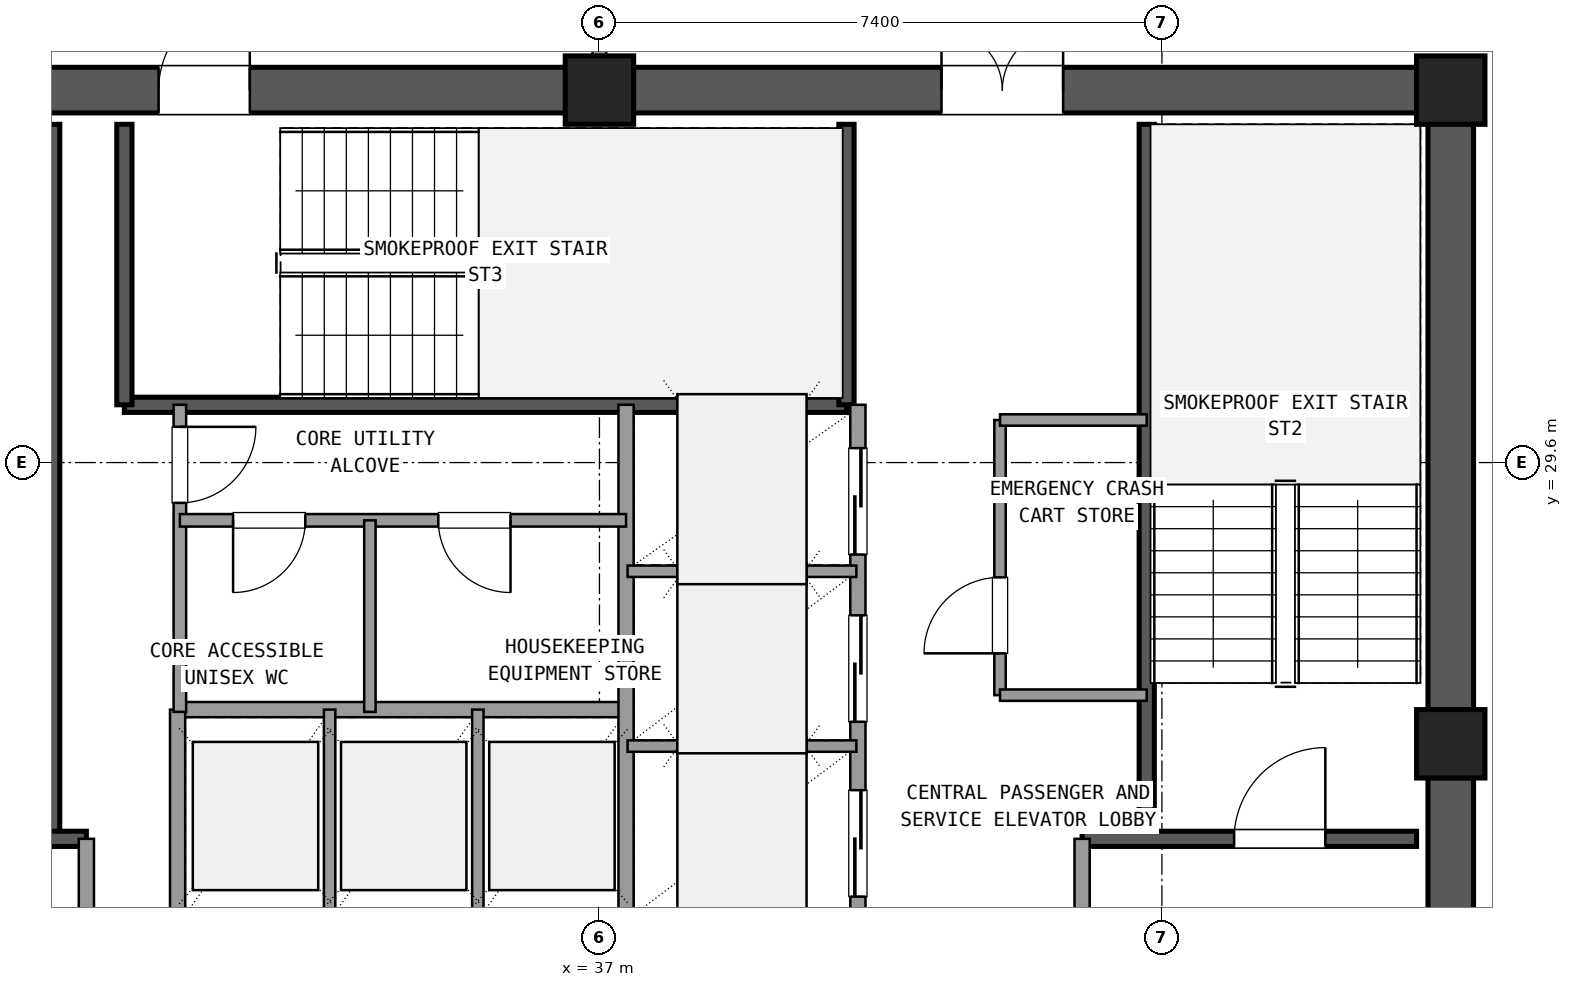
"""IFC4 building model, lengths in metres.
Left out: names, types, materials, properties, quantities, classifications, styles, units other than length and angle.
Written with IfcOpenShell. Run it as: python <this file> out.ifc"""

import sys

from ifc_helpers import new_model, si_unit, direction, frame, frame_2d, origin, origin_2d, place, context, subcontext, project, spatial, rectangle, extrude, element, fill, save


model = new_model("IFC4")
c1 = context("Model", 3, precision=1e-05, world=origin(), true_north=direction((0.0, 1.0)))
c2 = subcontext(c1, "Body", "Model", "MODEL_VIEW")
j1 = project(units=[si_unit("LENGTHUNIT", "METRE"), si_unit("PLANEANGLEUNIT", "RADIAN")], contexts=[c1])
p1 = place(None, origin())
s1 = spatial("IfcSite", under=j1, at=p1, CompositionType="ELEMENT")
p2 = place(p1, origin())
s2 = spatial("IfcBuilding", under=s1, at=p2, CompositionType="ELEMENT")
p3 = place(p2, frame((0.0, 0.0, 221.58)))
s3 = spatial("IfcBuildingStorey", under=s2, at=p3, CompositionType="ELEMENT", Elevation=221.58)
for number, where, z_axis, x_axis in (
    (1, (48.2, 25.9, 0.0), (0.0, 0.0, 1.0), (1.0, 0.0, 0.0)),
    (2, (48.2, 34.5, 0.0), (0.0, 0.0, 1.0), (1.0, 0.0, 0.0)),
    (3, (37.0, 34.5, 0.0), (0.0, 0.0, 1.0), (1.0, 0.0, 0.0)),
):
    element("IfcColumn", number, at=place(p3, frame(where, z_axis=z_axis, x_axis=x_axis)), inside=s3, PredefinedType="COLUMN", context=c2, shape_type="SweptSolid", body=[
        extrude(rectangle(XDim=0.9, YDim=0.9, at=origin_2d()), origin(), (0.0, 0.0, 1.0), 3.6),
    ])
p4 = place(p3, frame((48.2, 17.745, 0.0), z_axis=(0.0, 0.0, 1.0), x_axis=(0.0, 1.0, 0.0)))
e4 = element("IfcWall", 4, at=p4, inside=s3, PredefinedType="SHEAR", context=c2, shape_type="SweptSolid", body=[
    extrude(rectangle(XDim=7.71, YDim=0.6, at=frame_2d((3.855, 0.0))), origin(), (0.0, 0.0, 1.0), 3.32),
])
p5 = place(p4, frame((4.305, 0.0, 0.0)))
e5 = element("IfcOpeningElement", 5, at=p5, cuts=e4, PredefinedType="OPENING", context=c2, shape_type="SweptSolid", body=[
    extrude(rectangle(XDim=1.2, YDim=2.15, at=frame_2d((0.6, 1.075))), frame((0.0, 0.31, 0.0), z_axis=(0.0, -1.0, 0.0), x_axis=(1.0, 0.0, 0.0)), (0.0, 0.0, 1.0), 0.62),
])
p6 = place(p3, frame((48.2, 26.345, 0.0), z_axis=(0.0, 0.0, 1.0), x_axis=(0.0, 1.0, 0.0)))
e6 = element("IfcWall", 6, at=p6, inside=s3, PredefinedType="SHEAR", context=c2, shape_type="SweptSolid", body=[
    extrude(rectangle(XDim=7.71, YDim=0.6, at=frame_2d((3.855, 0.0))), origin(), (0.0, 0.0, 1.0), 3.32),
])
p7 = place(p3, frame((47.755, 34.5, 0.0), z_axis=(0.0, 0.0, 1.0), x_axis=(-1.0, 0.0, 0.0)))
e7 = element("IfcWall", 7, at=p7, inside=s3, PredefinedType="SHEAR", context=c2, shape_type="SweptSolid", body=[
    extrude(rectangle(XDim=10.31, YDim=0.6, at=frame_2d((5.155, 0.0))), origin(), (0.0, 0.0, 1.0), 3.32),
])
p8 = place(p7, frame((4.655, 0.0, 0.0)))
e8 = element("IfcOpeningElement", 8, at=p8, cuts=e7, PredefinedType="OPENING", context=c2, shape_type="SweptSolid", body=[
    extrude(rectangle(XDim=1.6, YDim=2.2, at=frame_2d((0.8, 1.1))), frame((0.0, 0.31, 0.0), z_axis=(0.0, -1.0, 0.0), x_axis=(1.0, 0.0, 0.0)), (0.0, 0.0, 1.0), 0.62),
])
p9 = place(p3, frame((36.555, 34.5, 0.0), z_axis=(0.0, 0.0, 1.0), x_axis=(-1.0, 0.0, 0.0)))
e9 = element("IfcWall", 9, at=p9, inside=s3, PredefinedType="SHEAR", context=c2, shape_type="SweptSolid", body=[
    extrude(rectangle(XDim=10.31, YDim=0.6, at=frame_2d((5.155, 0.0))), origin(), (0.0, 0.0, 1.0), 3.32),
])
p10 = place(p9, frame((4.155, 0.0, 0.0)))
e10 = element("IfcOpeningElement", 10, at=p10, cuts=e9, PredefinedType="OPENING", context=c2, shape_type="SweptSolid", body=[
    extrude(rectangle(XDim=1.2, YDim=2.15, at=frame_2d((0.6, 1.075))), frame((0.0, 0.31, 0.0), z_axis=(0.0, -1.0, 0.0), x_axis=(1.0, 0.0, 0.0)), (0.0, 0.0, 1.0), 0.62),
])
p11 = place(p3, frame((29.8, 24.65, 0.0), z_axis=(0.0, 0.0, 1.0), x_axis=(0.0, 1.0, 0.0)))
e11 = element("IfcWall", 11, at=p11, inside=s3, PredefinedType="SHEAR", context=c2, shape_type="SweptSolid", body=[
    extrude(rectangle(XDim=9.4, YDim=0.2, at=frame_2d((4.7, 0.0))), origin(), (0.0, 0.0, 1.0), 3.32),
])
p12 = place(p3, frame((26.25, 24.65, 0.0), z_axis=(0.0, 0.0, 1.0), x_axis=(1.0, 0.0, 0.0)))
e12 = element("IfcWall", 12, at=p12, inside=s3, PredefinedType="SHEAR", context=c2, shape_type="SweptSolid", body=[
    extrude(rectangle(XDim=4.0, YDim=0.2, at=frame_2d((2.0, 0.0))), origin(), (0.0, 0.0, 1.0), 3.32),
])
p13 = place(p12, frame((1.0, 0.0, 0.0)))
e13 = element("IfcOpeningElement", 13, at=p13, cuts=e12, PredefinedType="OPENING", context=c2, shape_type="SweptSolid", body=[
    extrude(rectangle(XDim=1.2, YDim=2.15, at=frame_2d((0.6, 1.075))), frame((0.0, 0.11, 0.0), z_axis=(0.0, -1.0, 0.0), x_axis=(1.0, 0.0, 0.0)), (0.0, 0.0, 1.0), 0.22),
])
p14 = place(p3, frame((44.2, 24.65, 0.0), z_axis=(0.0, 0.0, 1.0), x_axis=(0.0, 1.0, 0.0)))
e14 = element("IfcWall", 14, at=p14, inside=s3, PredefinedType="SHEAR", context=c2, shape_type="SweptSolid", body=[
    extrude(rectangle(XDim=9.4, YDim=0.2, at=frame_2d((4.7, 0.0))), origin(), (0.0, 0.0, 1.0), 3.32),
])
p15 = place(p3, frame((43.35, 24.65, 0.0), z_axis=(0.0, 0.0, 1.0), x_axis=(1.0, 0.0, 0.0)))
e15 = element("IfcWall", 15, at=p15, inside=s3, PredefinedType="SHEAR", context=c2, shape_type="SweptSolid", body=[
    extrude(rectangle(XDim=4.4, YDim=0.2, at=frame_2d((2.2, 0.0))), origin(), (0.0, 0.0, 1.0), 3.32),
])
p16 = place(p15, frame((2.0, 0.0, 0.0)))
e16 = element("IfcOpeningElement", 16, at=p16, cuts=e15, PredefinedType="OPENING", context=c2, shape_type="SweptSolid", body=[
    extrude(rectangle(XDim=1.2, YDim=2.15, at=frame_2d((0.6, 1.075))), frame((0.0, 0.11, 0.0), z_axis=(0.0, -1.0, 0.0), x_axis=(1.0, 0.0, 0.0)), (0.0, 0.0, 1.0), 0.22),
])
p17 = place(p3, frame((30.75, 30.36, 0.0), z_axis=(0.0, 0.0, 1.0), x_axis=(1.0, 0.0, 0.0)))
e17 = element("IfcWall", 17, at=p17, inside=s3, PredefinedType="SHEAR", context=c2, shape_type="SweptSolid", body=[
    extrude(rectangle(XDim=9.5, YDim=0.2, at=frame_2d((4.75, 0.0))), origin(), (0.0, 0.0, 1.0), 3.32),
])
for number, where, z_axis, x_axis in (
    (18, (30.75, 30.36, 0.0), (0.0, 0.0, 1.0), (0.0, 1.0, 0.0)),
    (19, (40.25, 30.36, 0.0), (0.0, 0.0, 1.0), (0.0, 1.0, 0.0)),
):
    element("IfcWall", number, at=place(p3, frame(where, z_axis=z_axis, x_axis=x_axis)), inside=s3, PredefinedType="SHEAR", context=c2, shape_type="SweptSolid", body=[
        extrude(rectangle(XDim=3.69, YDim=0.2, at=frame_2d((1.845, 0.0))), origin(), (0.0, 0.0, 1.0), 3.32),
    ])
p18 = place(p3, frame((30.25, 17.75, 0.0), z_axis=(0.0, 0.0, 1.0), x_axis=(0.0, 1.0, 0.0)))
e20 = element("IfcWall", 20, at=p18, inside=s3, PredefinedType="SOLIDWALL", context=c2, shape_type="SweptSolid", body=[
    extrude(rectangle(XDim=6.9, YDim=0.2, at=frame_2d((3.45, 0.0))), origin(), (0.0, 0.0, 1.0), 2.61),
])
p19 = place(p18, frame((4.15, 0.0, 0.0)))
e21 = element("IfcOpeningElement", 21, at=p19, cuts=e20, PredefinedType="OPENING", context=c2, shape_type="SweptSolid", body=[
    extrude(rectangle(XDim=1.2, YDim=2.15, at=frame_2d((0.6, 1.075))), frame((0.0, 0.11, 0.0), z_axis=(0.0, -1.0, 0.0), x_axis=(1.0, 0.0, 0.0)), (0.0, 0.0, 1.0), 0.22),
])
p20 = place(p3, frame((43.35, 17.75, 0.0), z_axis=(0.0, 0.0, 1.0), x_axis=(0.0, 1.0, 0.0)))
e22 = element("IfcWall", 22, at=p20, inside=s3, PredefinedType="SOLIDWALL", context=c2, shape_type="SweptSolid", body=[
    extrude(rectangle(XDim=6.9, YDim=0.2, at=frame_2d((3.45, 0.0))), origin(), (0.0, 0.0, 1.0), 2.61),
])
p21 = place(p20, frame((4.15, 0.0, 0.0)))
e23 = element("IfcOpeningElement", 23, at=p21, cuts=e22, PredefinedType="OPENING", context=c2, shape_type="SweptSolid", body=[
    extrude(rectangle(XDim=1.2, YDim=2.15, at=frame_2d((0.6, 1.075))), frame((0.0, 0.11, 0.0), z_axis=(0.0, -1.0, 0.0), x_axis=(1.0, 0.0, 0.0)), (0.0, 0.0, 1.0), 0.22),
])
p22 = place(p3, frame((31.45, 26.35, 0.0), z_axis=(0.0, 0.0, 1.0), x_axis=(1.0, 0.0, 0.0)))
e24 = element("IfcWall", 24, at=p22, inside=s3, PredefinedType="SOLIDWALL", context=c2, shape_type="SweptSolid", body=[
    extrude(rectangle(XDim=5.9, YDim=0.2, at=frame_2d((2.95, 0.0))), origin(), (0.0, 0.0, 1.0), 2.61),
])
p23 = place(p3, frame((31.45, 23.54, 0.0), z_axis=(0.0, 0.0, 1.0), x_axis=(0.0, 1.0, 0.0)))
e25 = element("IfcWall", 25, at=p23, inside=s3, PredefinedType="SOLIDWALL", context=c2, shape_type="SweptSolid", body=[
    extrude(rectangle(XDim=2.81, YDim=0.2, at=frame_2d((1.405, 0.0))), origin(), (0.0, 0.0, 1.0), 2.61),
])
for number, where, z_axis, x_axis in (
    (26, (33.45, 23.54, 0.0), (0.0, 0.0, 1.0), (0.0, 1.0, 0.0)),
    (27, (35.4, 23.54, 0.0), (0.0, 0.0, 1.0), (0.0, 1.0, 0.0)),
):
    element("IfcWall", number, at=place(p3, frame(where, z_axis=z_axis, x_axis=x_axis)), inside=s3, PredefinedType="PARTITIONING", context=c2, shape_type="SweptSolid", body=[
        extrude(rectangle(XDim=2.81, YDim=0.15, at=frame_2d((1.405, 0.0))), origin(), (0.0, 0.0, 1.0), 2.61),
    ])
p24 = place(p3, frame((37.35, 23.54, 0.0), z_axis=(0.0, 0.0, 1.0), x_axis=(0.0, 1.0, 0.0)))
e28 = element("IfcWall", 28, at=p24, inside=s3, PredefinedType="SOLIDWALL", context=c2, shape_type="SweptSolid", body=[
    extrude(rectangle(XDim=6.82, YDim=0.2, at=frame_2d((3.41, 0.0))), origin(), (0.0, 0.0, 1.0), 2.61),
])
p25 = place(p3, frame((40.4, 23.54, 0.0), z_axis=(0.0, 0.0, 1.0), x_axis=(0.0, 1.0, 0.0)))
e29 = element("IfcWall", 29, at=p25, inside=s3, PredefinedType="SOLIDWALL", context=c2, shape_type="SweptSolid", body=[
    extrude(rectangle(XDim=6.82, YDim=0.2, at=frame_2d((3.41, 0.0))), origin(), (0.0, 0.0, 1.0), 2.61),
])
p26 = place(p25, frame((0.35, 0.0, 0.0)))
e30 = element("IfcOpeningElement", 30, at=p26, cuts=e29, PredefinedType="OPENING", context=c2, shape_type="SweptSolid", body=[
    extrude(rectangle(XDim=1.4, YDim=2.2, at=frame_2d((0.7, 1.1))), frame((0.0, 0.11, 0.0), z_axis=(0.0, -1.0, 0.0), x_axis=(1.0, 0.0, 0.0)), (0.0, 0.0, 1.0), 0.22),
])
p27 = place(p25, frame((2.65, 0.0, 0.0)))
e31 = element("IfcOpeningElement", 31, at=p27, cuts=e29, PredefinedType="OPENING", context=c2, shape_type="SweptSolid", body=[
    extrude(rectangle(XDim=1.4, YDim=2.2, at=frame_2d((0.7, 1.1))), frame((0.0, 0.11, 0.0), z_axis=(0.0, -1.0, 0.0), x_axis=(1.0, 0.0, 0.0)), (0.0, 0.0, 1.0), 0.22),
])
p28 = place(p25, frame((4.85, 0.0, 0.0)))
e32 = element("IfcOpeningElement", 32, at=p28, cuts=e29, PredefinedType="OPENING", context=c2, shape_type="SweptSolid", body=[
    extrude(rectangle(XDim=1.4, YDim=2.2, at=frame_2d((0.7, 1.1))), frame((0.0, 0.11, 0.0), z_axis=(0.0, -1.0, 0.0), x_axis=(1.0, 0.0, 0.0)), (0.0, 0.0, 1.0), 0.22),
])
for number, where, z_axis, x_axis in (
    (33, (37.37, 25.87, 0.0), (0.0, 0.0, 1.0), (1.0, 0.0, 0.0)),
    (34, (37.37, 28.17, 0.0), (0.0, 0.0, 1.0), (1.0, 0.0, 0.0)),
):
    element("IfcWall", number, at=place(p3, frame(where, z_axis=z_axis, x_axis=x_axis)), inside=s3, PredefinedType="PARTITIONING", context=c2, shape_type="SweptSolid", body=[
        extrude(rectangle(XDim=3.01, YDim=0.15, at=frame_2d((1.505, 0.0))), origin(), (0.0, 0.0, 1.0), 2.61),
    ])
p29 = place(p3, frame((42.27, 26.54, 0.0), z_axis=(0.0, 0.0, 1.0), x_axis=(0.0, 1.0, 0.0)))
e35 = element("IfcWall", 35, at=p29, inside=s3, PredefinedType="PARTITIONING", context=c2, shape_type="SweptSolid", body=[
    extrude(rectangle(XDim=3.62, YDim=0.15, at=frame_2d((1.81, 0.0))), origin(), (0.0, 0.0, 1.0), 2.61),
])
p30 = place(p29, frame((0.55, 0.0, 0.0)))
e36 = element("IfcOpeningElement", 36, at=p30, cuts=e35, PredefinedType="OPENING", context=c2, shape_type="SweptSolid", body=[
    extrude(rectangle(XDim=1.0, YDim=2.15, at=frame_2d((0.5, 1.075))), frame((0.0, 0.085, 0.0), z_axis=(0.0, -1.0, 0.0), x_axis=(1.0, 0.0, 0.0)), (0.0, 0.0, 1.0), 0.17),
])
for number, where, z_axis, x_axis in (
    (37, (42.27, 26.54, 0.0), (0.0, 0.0, 1.0), (1.0, 0.0, 0.0)),
    (38, (42.27, 30.16, 0.0), (0.0, 0.0, 1.0), (1.0, 0.0, 0.0)),
):
    element("IfcWall", number, at=place(p3, frame(where, z_axis=z_axis, x_axis=x_axis)), inside=s3, PredefinedType="PARTITIONING", context=c2, shape_type="SweptSolid", body=[
        extrude(rectangle(XDim=1.93, YDim=0.15, at=frame_2d((0.965, 0.0))), origin(), (0.0, 0.0, 1.0), 2.61),
    ])
p31 = place(p3, frame((31.48, 26.32, 0.0), z_axis=(0.0, 0.0, 1.0), x_axis=(0.0, 1.0, 0.0)))
e39 = element("IfcWall", 39, at=p31, inside=s3, PredefinedType="PLUMBINGWALL", context=c2, shape_type="SweptSolid", body=[
    extrude(rectangle(XDim=4.04, YDim=0.165, at=frame_2d((2.02, 0.0))), origin(), (0.0, 0.0, 1.0), 2.61),
])
p32 = place(p31, frame((2.75, 0.0, 0.0)))
e40 = element("IfcOpeningElement", 40, at=p32, cuts=e39, PredefinedType="OPENING", context=c2, shape_type="SweptSolid", body=[
    extrude(rectangle(XDim=1.0, YDim=2.15, at=frame_2d((0.5, 1.075))), frame((0.0, 0.093, 0.0), z_axis=(0.0, -1.0, 0.0), x_axis=(1.0, 0.0, 0.0)), (0.0, 0.0, 1.0), 0.185),
])
p33 = place(p3, frame((31.48, 28.84, 0.0), z_axis=(0.0, 0.0, 1.0), x_axis=(1.0, 0.0, 0.0)))
e41 = element("IfcWall", 41, at=p33, inside=s3, PredefinedType="PLUMBINGWALL", context=c2, shape_type="SweptSolid", body=[
    extrude(rectangle(XDim=5.87, YDim=0.165, at=frame_2d((2.935, 0.0))), origin(), (0.0, 0.0, 1.0), 2.61),
])
p34 = place(p33, frame((0.7, 0.0, 0.0)))
e42 = element("IfcOpeningElement", 42, at=p34, cuts=e41, PredefinedType="OPENING", context=c2, shape_type="SweptSolid", body=[
    extrude(rectangle(XDim=0.95, YDim=2.1, at=frame_2d((0.475, 1.05))), frame((0.0, 0.093, 0.0), z_axis=(0.0, -1.0, 0.0), x_axis=(1.0, 0.0, 0.0)), (0.0, 0.0, 1.0), 0.185),
])
p35 = place(p33, frame((3.4, 0.0, 0.0)))
e43 = element("IfcOpeningElement", 43, at=p35, cuts=e41, PredefinedType="OPENING", context=c2, shape_type="SweptSolid", body=[
    extrude(rectangle(XDim=0.95, YDim=2.1, at=frame_2d((0.475, 1.05))), frame((0.0, 0.093, 0.0), z_axis=(0.0, -1.0, 0.0), x_axis=(1.0, 0.0, 0.0)), (0.0, 0.0, 1.0), 0.185),
])
p36 = place(p3, frame((33.98, 26.32, 0.0), z_axis=(0.0, 0.0, 1.0), x_axis=(0.0, 1.0, 0.0)))
e44 = element("IfcWall", 44, at=p36, inside=s3, PredefinedType="PARTITIONING", context=c2, shape_type="SweptSolid", body=[
    extrude(rectangle(XDim=2.52, YDim=0.15, at=frame_2d((1.26, 0.0))), origin(), (0.0, 0.0, 1.0), 2.61),
])
p37 = place(p3, frame((37.0, 34.95, 0.0), z_axis=(0.0, 0.0, 1.0), x_axis=(0.0, 1.0, 0.0)))
e45 = element("IfcWall", 45, at=p37, inside=s3, PredefinedType="PARTITIONING", context=c2, shape_type="SweptSolid", body=[
    extrude(rectangle(XDim=2.7, YDim=0.18, at=frame_2d((1.35, 0.0))), origin(), (0.0, 0.0, 1.0), 2.61),
])
p38 = place(p37, frame((0.35, 0.0, 0.0)))
e46 = element("IfcOpeningElement", 46, at=p38, cuts=e45, PredefinedType="OPENING", context=c2, shape_type="SweptSolid", body=[
    extrude(rectangle(XDim=2.0, YDim=2.2, at=frame_2d((1.0, 1.1))), frame((0.0, 0.1, 0.0), z_axis=(0.0, -1.0, 0.0), x_axis=(1.0, 0.0, 0.0)), (0.0, 0.0, 1.0), 0.2),
])
p39 = place(p16, origin())
e47 = element("IfcDoor", 47, at=p39, inside=s3, OperationType="SINGLE_SWING_RIGHT", PredefinedType="DOOR", context=c2, shape_type="SweptSolid", body=[
    extrude(rectangle(XDim=1.2, YDim=2.15, at=frame_2d((0.6, 1.075))), frame((0.0, 0.025, 0.0), z_axis=(0.0, -1.0, 0.0), x_axis=(1.0, 0.0, 0.0)), (0.0, 0.0, 1.0), 0.05),
])
fill(e16, e47)
p40 = place(p8, frame((1.6, 0.0, 0.0), z_axis=(0.0, 0.0, 1.0), x_axis=(-1.0, 0.0, 0.0)))
e48 = element("IfcDoor", 48, at=p40, inside=s3, OperationType="DOUBLE_DOOR_SINGLE_SWING", PredefinedType="DOOR", context=c2, shape_type="SweptSolid", body=[
    extrude(rectangle(XDim=1.6, YDim=2.2, at=frame_2d((0.8, 1.1))), frame((0.0, 0.025, 0.0), z_axis=(0.0, -1.0, 0.0), x_axis=(1.0, 0.0, 0.0)), (0.0, 0.0, 1.0), 0.05),
])
fill(e8, e48)
p41 = place(p10, frame((1.2, 0.0, 0.0), z_axis=(0.0, 0.0, 1.0), x_axis=(-1.0, 0.0, 0.0)))
e49 = element("IfcDoor", 49, at=p41, inside=s3, OperationType="SINGLE_SWING_LEFT", PredefinedType="DOOR", context=c2, shape_type="SweptSolid", body=[
    extrude(rectangle(XDim=1.2, YDim=2.15, at=frame_2d((0.6, 1.075))), frame((0.0, 0.025, 0.0), z_axis=(0.0, -1.0, 0.0), x_axis=(1.0, 0.0, 0.0)), (0.0, 0.0, 1.0), 0.05),
])
fill(e10, e49)
p42 = place(p26, origin())
e50 = element("IfcDoor", 50, at=p42, inside=s3, OperationType="SLIDING_TO_LEFT", PredefinedType="DOOR", context=c2, shape_type="SweptSolid", body=[
    extrude(rectangle(XDim=1.4, YDim=2.2, at=frame_2d((0.7, 1.1))), frame((0.0, 0.025, 0.0), z_axis=(0.0, -1.0, 0.0), x_axis=(1.0, 0.0, 0.0)), (0.0, 0.0, 1.0), 0.05),
])
fill(e30, e50)
p43 = place(p27, origin())
e51 = element("IfcDoor", 51, at=p43, inside=s3, OperationType="SLIDING_TO_LEFT", PredefinedType="DOOR", context=c2, shape_type="SweptSolid", body=[
    extrude(rectangle(XDim=1.4, YDim=2.2, at=frame_2d((0.7, 1.1))), frame((0.0, 0.025, 0.0), z_axis=(0.0, -1.0, 0.0), x_axis=(1.0, 0.0, 0.0)), (0.0, 0.0, 1.0), 0.05),
])
fill(e31, e51)
p44 = place(p28, origin())
e52 = element("IfcDoor", 52, at=p44, inside=s3, OperationType="SLIDING_TO_RIGHT", PredefinedType="DOOR", context=c2, shape_type="SweptSolid", body=[
    extrude(rectangle(XDim=1.4, YDim=2.2, at=frame_2d((0.7, 1.1))), frame((0.0, 0.025, 0.0), z_axis=(0.0, -1.0, 0.0), x_axis=(1.0, 0.0, 0.0)), (0.0, 0.0, 1.0), 0.05),
])
fill(e32, e52)
p45 = place(p30, origin())
e53 = element("IfcDoor", 53, at=p45, inside=s3, OperationType="SINGLE_SWING_LEFT", PredefinedType="DOOR", context=c2, shape_type="SweptSolid", body=[
    extrude(rectangle(XDim=1.0, YDim=2.15, at=frame_2d((0.5, 1.075))), frame((0.0, 0.025, 0.0), z_axis=(0.0, -1.0, 0.0), x_axis=(1.0, 0.0, 0.0)), (0.0, 0.0, 1.0), 0.05),
])
fill(e36, e53)
p46 = place(p32, frame((1.0, 0.0, 0.0), z_axis=(0.0, 0.0, 1.0), x_axis=(-1.0, 0.0, 0.0)))
e54 = element("IfcDoor", 54, at=p46, inside=s3, OperationType="SINGLE_SWING_RIGHT", PredefinedType="DOOR", context=c2, shape_type="SweptSolid", body=[
    extrude(rectangle(XDim=1.0, YDim=2.15, at=frame_2d((0.5, 1.075))), frame((0.0, 0.025, 0.0), z_axis=(0.0, -1.0, 0.0), x_axis=(1.0, 0.0, 0.0)), (0.0, 0.0, 1.0), 0.05),
])
fill(e40, e54)
p47 = place(p34, frame((0.95, 0.0, 0.0), z_axis=(0.0, 0.0, 1.0), x_axis=(-1.0, 0.0, 0.0)))
e55 = element("IfcDoor", 55, at=p47, inside=s3, OperationType="SINGLE_SWING_LEFT", PredefinedType="DOOR", context=c2, shape_type="SweptSolid", body=[
    extrude(rectangle(XDim=0.95, YDim=2.1, at=frame_2d((0.475, 1.05))), frame((0.0, 0.025, 0.0), z_axis=(0.0, -1.0, 0.0), x_axis=(1.0, 0.0, 0.0)), (0.0, 0.0, 1.0), 0.05),
])
fill(e42, e55)
p48 = place(p35, frame((0.95, 0.0, 0.0), z_axis=(0.0, 0.0, 1.0), x_axis=(-1.0, 0.0, 0.0)))
e56 = element("IfcDoor", 56, at=p48, inside=s3, OperationType="SINGLE_SWING_RIGHT", PredefinedType="DOOR", context=c2, shape_type="SweptSolid", body=[
    extrude(rectangle(XDim=0.95, YDim=2.1, at=frame_2d((0.475, 1.05))), frame((0.0, 0.025, 0.0), z_axis=(0.0, -1.0, 0.0), x_axis=(1.0, 0.0, 0.0)), (0.0, 0.0, 1.0), 0.05),
])
fill(e43, e56)
save(model, sys.argv[1])
